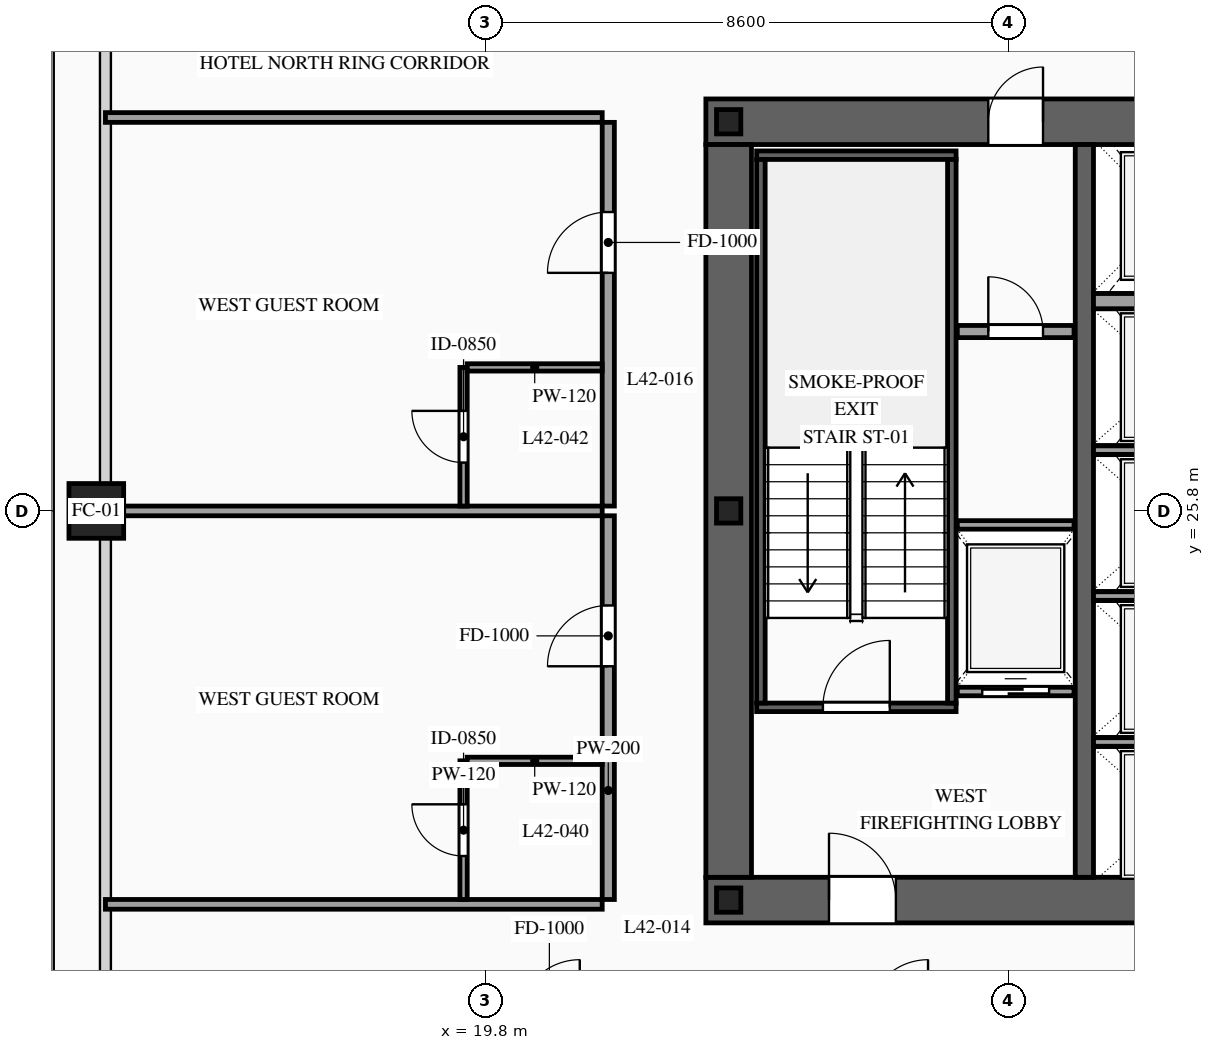
"""IFC4 building model, lengths in metres.
Left out: names, types, materials, properties, quantities, classifications, styles, units other than length and angle.
Written with IfcOpenShell. Run it as: python <this file> out.ifc"""

import sys

from ifc_helpers import new_model, si_unit, direction, frame, frame_2d, origin, origin_2d, place, context, subcontext, project, spatial, rectangle, hollow_rectangle, i_section, extrude, source, transform, mapped, element, fill, save


model = new_model("IFC4")
c1 = context("Model", 3, precision=1e-05, world=origin(), true_north=direction((0.0, 1.0)))
c2 = subcontext(c1, "Body", "Model", "MODEL_VIEW")
j1 = project(units=[si_unit("LENGTHUNIT", "METRE"), si_unit("PLANEANGLEUNIT", "RADIAN")], contexts=[c1])
p1 = place(None, origin())
s1 = spatial("IfcSite", under=j1, at=p1, CompositionType="ELEMENT")
p2 = place(p1, origin())
s2 = spatial("IfcBuilding", under=s1, at=p2, CompositionType="ELEMENT")
p3 = place(p2, frame((0.0, 0.0, 159.6)))
s3 = spatial("IfcBuildingStorey", under=s2, at=p3, CompositionType="ELEMENT", Elevation=159.6)
p4 = place(p3, frame((23.425, 19.4, 0.0), z_axis=(0.0, 0.0, 1.0), x_axis=(1.0, 0.0, 0.0)))
e1 = element("IfcWall", 1, at=p4, inside=s3, PredefinedType="SHEAR", context=c2, shape_type="SweptSolid", body=[
    extrude(rectangle(XDim=27.15, YDim=0.75, at=frame_2d((13.575, 0.0))), origin(), (0.0, 0.0, 1.0), 3.6),
])
p5 = place(p4, frame((2.025, 0.0, 0.0)))
e2 = element("IfcOpeningElement", 2, at=p5, cuts=e1, PredefinedType="OPENING", context=c2, shape_type="SweptSolid", body=[
    extrude(rectangle(XDim=1.1, YDim=2.2, at=frame_2d((0.55, 1.1))), frame((0.0, 0.39, 0.0), z_axis=(0.0, -1.0, 0.0), x_axis=(1.0, 0.0, 0.0)), (0.0, 0.0, 1.0), 0.78),
])
p6 = place(p4, frame((9.925, 0.0, 0.0)))
e3 = element("IfcOpeningElement", 3, at=p6, cuts=e1, PredefinedType="OPENING", context=c2, shape_type="SweptSolid", body=[
    extrude(rectangle(XDim=1.1, YDim=2.2, at=frame_2d((0.55, 1.1))), frame((0.0, 0.39, 0.0), z_axis=(0.0, -1.0, 0.0), x_axis=(1.0, 0.0, 0.0)), (0.0, 0.0, 1.0), 0.78),
])
p7 = place(p4, frame((23.125, 0.0, 0.0)))
e4 = element("IfcOpeningElement", 4, at=p7, cuts=e1, PredefinedType="OPENING", context=c2, shape_type="SweptSolid", body=[
    extrude(rectangle(XDim=1.1, YDim=2.2, at=frame_2d((0.55, 1.1))), frame((0.0, 0.39, 0.0), z_axis=(0.0, -1.0, 0.0), x_axis=(1.0, 0.0, 0.0)), (0.0, 0.0, 1.0), 0.78),
])
p8 = place(p4, frame((19.745, 0.0, 0.0)))
e5 = element("IfcOpeningElement", 5, at=p8, cuts=e1, PredefinedType="OPENING", context=c2, shape_type="SweptSolid", body=[
    extrude(rectangle(XDim=0.9, YDim=2.15, at=frame_2d((0.45, 1.075))), frame((0.0, 0.39, 0.0), z_axis=(0.0, -1.0, 0.0), x_axis=(1.0, 0.0, 0.0)), (0.0, 0.0, 1.0), 0.78),
])
p9 = place(p4, frame((18.305, 0.0, 0.0)))
e6 = element("IfcOpeningElement", 6, at=p9, cuts=e1, PredefinedType="OPENING", context=c2, shape_type="SweptSolid", body=[
    extrude(rectangle(XDim=0.9, YDim=2.15, at=frame_2d((0.45, 1.075))), frame((0.0, 0.39, 0.0), z_axis=(0.0, -1.0, 0.0), x_axis=(1.0, 0.0, 0.0)), (0.0, 0.0, 1.0), 0.78),
])
p10 = place(p3, frame((23.425, 32.2, 0.0), z_axis=(0.0, 0.0, 1.0), x_axis=(1.0, 0.0, 0.0)))
e7 = element("IfcWall", 7, at=p10, inside=s3, PredefinedType="SHEAR", context=c2, shape_type="SweptSolid", body=[
    extrude(rectangle(XDim=27.15, YDim=0.75, at=frame_2d((13.575, 0.0))), origin(), (0.0, 0.0, 1.0), 3.6),
])
p11 = place(p10, frame((4.645, 0.0, 0.0)))
e8 = element("IfcOpeningElement", 8, at=p11, cuts=e7, PredefinedType="OPENING", context=c2, shape_type="SweptSolid", body=[
    extrude(rectangle(XDim=0.9, YDim=2.15, at=frame_2d((0.45, 1.075))), frame((0.0, 0.39, 0.0), z_axis=(0.0, -1.0, 0.0), x_axis=(1.0, 0.0, 0.0)), (0.0, 0.0, 1.0), 0.78),
])
p12 = place(p10, frame((9.925, 0.0, 0.0)))
e9 = element("IfcOpeningElement", 9, at=p12, cuts=e7, PredefinedType="OPENING", context=c2, shape_type="SweptSolid", body=[
    extrude(rectangle(XDim=1.1, YDim=2.2, at=frame_2d((0.55, 1.1))), frame((0.0, 0.39, 0.0), z_axis=(0.0, -1.0, 0.0), x_axis=(1.0, 0.0, 0.0)), (0.0, 0.0, 1.0), 0.78),
])
p13 = place(p10, frame((15.775, 0.0, 0.0)))
e10 = element("IfcOpeningElement", 10, at=p13, cuts=e7, PredefinedType="OPENING", context=c2, shape_type="SweptSolid", body=[
    extrude(rectangle(XDim=1.1, YDim=2.2, at=frame_2d((0.55, 1.1))), frame((0.0, 0.39, 0.0), z_axis=(0.0, -1.0, 0.0), x_axis=(1.0, 0.0, 0.0)), (0.0, 0.0, 1.0), 0.78),
])
p14 = place(p10, frame((18.305, 0.0, 0.0)))
e11 = element("IfcOpeningElement", 11, at=p14, cuts=e7, PredefinedType="OPENING", context=c2, shape_type="SweptSolid", body=[
    extrude(rectangle(XDim=0.9, YDim=2.15, at=frame_2d((0.45, 1.075))), frame((0.0, 0.39, 0.0), z_axis=(0.0, -1.0, 0.0), x_axis=(1.0, 0.0, 0.0)), (0.0, 0.0, 1.0), 0.78),
])
p15 = place(p10, frame((19.745, 0.0, 0.0)))
e12 = element("IfcOpeningElement", 12, at=p15, cuts=e7, PredefinedType="OPENING", context=c2, shape_type="SweptSolid", body=[
    extrude(rectangle(XDim=0.9, YDim=2.15, at=frame_2d((0.45, 1.075))), frame((0.0, 0.39, 0.0), z_axis=(0.0, -1.0, 0.0), x_axis=(1.0, 0.0, 0.0)), (0.0, 0.0, 1.0), 0.78),
])
m1 = source(origin(), c2, "Body", "SweptSolid", [
    extrude(rectangle(XDim=12.05, YDim=0.75, at=frame_2d((6.025, 0.0))), origin(), (0.0, 0.0, 1.0), 3.6),
])
p16 = place(p3, frame((23.8, 19.775, 0.0), z_axis=(0.0, 0.0, 1.0), x_axis=(0.0, 1.0, 0.0)))
e13 = element("IfcWall", 13, at=p16, inside=s3, PredefinedType="SHEAR", context=c2, shape_type="MappedRepresentation", body=[
    mapped(m1, transform((0.0, 0.0, 0.0), scale=1.0)),
])
m2 = source(origin(), c2, "Body", "SweptSolid", [
    extrude(rectangle(XDim=12.05, YDim=0.3, at=frame_2d((6.025, 0.0))), origin(), (0.0, 0.0, 1.0), 3.6),
])
p17 = place(p3, frame((29.65, 19.775, 0.0), z_axis=(0.0, 0.0, 1.0), x_axis=(0.0, 1.0, 0.0)))
e14 = element("IfcWall", 14, at=p17, inside=s3, PredefinedType="SOLIDWALL", context=c2, shape_type="MappedRepresentation", body=[
    mapped(m2, transform((0.0, 0.0, 0.0), scale=1.0)),
])
m3 = source(origin(), c2, "Body", "SweptSolid", [
    extrude(i_section(OverallWidth=0.4, OverallDepth=0.4, WebThickness=0.013, FlangeThickness=0.021, at=origin_2d()), origin(), (0.0, 0.0, 1.0), 3.6),
])
for number, where, z_axis, x_axis in (
    (15, (23.8, 19.4, 0.0), (0.0, 0.0, 1.0), (1.0, 0.0, 0.0)),
    (16, (23.8, 25.8, 0.0), (0.0, 0.0, 1.0), (1.0, 0.0, 0.0)),
    (17, (23.8, 32.2, 0.0), (0.0, 0.0, 1.0), (1.0, 0.0, 0.0)),
):
    element("IfcColumn", number, at=place(p3, frame(where, z_axis=z_axis, x_axis=x_axis)), inside=s3, PredefinedType="COLUMN", context=c2, shape_type="MappedRepresentation", body=[
        mapped(m3, transform((0.0, 0.0, 0.0), scale=1.0)),
    ])
m4 = source(origin(), c2, "Body", "SweptSolid", [
    extrude(hollow_rectangle(XDim=0.9, YDim=0.9, WallThickness=0.042, at=origin_2d()), origin(), (0.0, 0.0, 1.0), 3.6),
])
p18 = place(p3, frame((13.4, 25.8, 0.0), z_axis=(0.0, 0.0, 1.0), x_axis=(1.0, 0.0, 0.0)))
e18 = element("IfcColumn", 18, at=p18, inside=s3, PredefinedType="COLUMN", context=c2, shape_type="MappedRepresentation", body=[
    mapped(m4, transform((0.0, 0.0, 0.0), scale=1.0)),
])
p19 = place(p3, frame((27.56, 22.83, 0.0), z_axis=(0.0, 0.0, 1.0), x_axis=(1.0, 0.0, 0.0)))
e19 = element("IfcWall", 19, at=p19, inside=s3, PredefinedType="SOLIDWALL", context=c2, shape_type="SweptSolid", body=[
    extrude(rectangle(XDim=1.92, YDim=0.14, at=frame_2d((0.96, 0.0))), origin(), (0.0, 0.0, 1.0), 3.38),
])
p20 = place(p19, frame((0.41, 0.0, 0.0)))
e20 = element("IfcOpeningElement", 20, at=p20, cuts=e19, PredefinedType="OPENING", context=c2, shape_type="SweptSolid", body=[
    extrude(rectangle(XDim=1.1, YDim=2.2, at=frame_2d((0.55, 1.1))), frame((0.0, 0.085, 0.0), z_axis=(0.0, -1.0, 0.0), x_axis=(1.0, 0.0, 0.0)), (0.0, 0.0, 1.0), 0.17),
])
m5 = source(origin(), c2, "Body", "SweptSolid", [
    extrude(rectangle(XDim=1.92, YDim=0.14, at=frame_2d((0.96, 0.0))), origin(), (0.0, 0.0, 1.0), 3.38),
])
p21 = place(p3, frame((27.56, 25.57, 0.0), z_axis=(0.0, 0.0, 1.0), x_axis=(1.0, 0.0, 0.0)))
e21 = element("IfcWall", 21, at=p21, inside=s3, PredefinedType="SOLIDWALL", context=c2, shape_type="MappedRepresentation", body=[
    mapped(m5, transform((0.0, 0.0, 0.0), scale=1.0)),
])
m6 = source(origin(), c2, "Body", "SweptSolid", [
    extrude(rectangle(XDim=2.5, YDim=0.14, at=frame_2d((1.25, 0.0))), origin(), (0.0, 0.0, 1.0), 3.38),
])
for number, where, z_axis, x_axis in (
    (22, (29.8, 22.0, 0.0), (0.0, 0.0, 1.0), (1.0, 0.0, 0.0)),
    (23, (29.8, 24.4, 0.0), (0.0, 0.0, 1.0), (1.0, 0.0, 0.0)),
    (24, (29.8, 26.8, 0.0), (0.0, 0.0, 1.0), (1.0, 0.0, 0.0)),
):
    element("IfcWall", number, at=place(p3, frame(where, z_axis=z_axis, x_axis=x_axis)), inside=s3, PredefinedType="SOLIDWALL", context=c2, shape_type="MappedRepresentation", body=[
        mapped(m6, transform((0.0, 0.0, 0.0), scale=1.0)),
    ])
m7 = source(origin(), c2, "Body", "SweptSolid", [
    extrude(rectangle(XDim=2.5, YDim=0.25, at=frame_2d((1.25, 0.0))), origin(), (0.0, 0.0, 1.0), 3.38),
])
p22 = place(p3, frame((29.8, 29.25, 0.0), z_axis=(0.0, 0.0, 1.0), x_axis=(1.0, 0.0, 0.0)))
e25 = element("IfcWall", 25, at=p22, inside=s3, PredefinedType="SOLIDWALL", context=c2, shape_type="MappedRepresentation", body=[
    mapped(m7, transform((0.0, 0.0, 0.0), scale=1.0)),
])
p23 = place(p3, frame((24.26, 22.57, 0.0), z_axis=(0.0, 0.0, 1.0), x_axis=(1.0, 0.0, 0.0)))
e26 = element("IfcWall", 26, at=p23, inside=s3, PredefinedType="SOLIDWALL", context=c2, shape_type="SweptSolid", body=[
    extrude(rectangle(XDim=3.28, YDim=0.14, at=frame_2d((1.64, 0.0))), origin(), (0.0, 0.0, 1.0), 3.38),
])
p24 = place(p23, frame((1.09, 0.0, 0.0)))
e27 = element("IfcOpeningElement", 27, at=p24, cuts=e26, PredefinedType="OPENING", context=c2, shape_type="SweptSolid", body=[
    extrude(rectangle(XDim=1.1, YDim=2.2, at=frame_2d((0.55, 1.1))), frame((0.0, 0.085, 0.0), z_axis=(0.0, -1.0, 0.0), x_axis=(1.0, 0.0, 0.0)), (0.0, 0.0, 1.0), 0.17),
])
m8 = source(origin(), c2, "Body", "SweptSolid", [
    extrude(rectangle(XDim=3.28, YDim=0.14, at=frame_2d((1.64, 0.0))), origin(), (0.0, 0.0, 1.0), 3.38),
])
p25 = place(p3, frame((24.26, 31.65, 0.0), z_axis=(0.0, 0.0, 1.0), x_axis=(1.0, 0.0, 0.0)))
e28 = element("IfcWall", 28, at=p25, inside=s3, PredefinedType="SOLIDWALL", context=c2, shape_type="MappedRepresentation", body=[
    mapped(m8, transform((0.0, 0.0, 0.0), scale=1.0)),
])
m9 = source(origin(), c2, "Body", "SweptSolid", [
    extrude(rectangle(XDim=8.94, YDim=0.14, at=frame_2d((4.47, 0.0))), origin(), (0.0, 0.0, 1.0), 3.38),
])
for number, where, z_axis, x_axis in (
    (29, (24.33, 22.64, 0.0), (0.0, 0.0, 1.0), (0.0, 1.0, 0.0)),
    (30, (27.47, 22.64, 0.0), (0.0, 0.0, 1.0), (0.0, 1.0, 0.0)),
):
    element("IfcWall", number, at=place(p3, frame(where, z_axis=z_axis, x_axis=x_axis)), inside=s3, PredefinedType="SOLIDWALL", context=c2, shape_type="MappedRepresentation", body=[
        mapped(m9, transform((0.0, 0.0, 0.0), scale=1.0)),
    ])
p26 = place(p3, frame((27.56, 28.75, 0.0), z_axis=(0.0, 0.0, 1.0), x_axis=(1.0, 0.0, 0.0)))
e31 = element("IfcWall", 31, at=p26, inside=s3, PredefinedType="PARTITIONING", context=c2, shape_type="SweptSolid", body=[
    extrude(rectangle(XDim=1.92, YDim=0.2, at=frame_2d((0.96, 0.0))), origin(), (0.0, 0.0, 1.0), 3.38),
])
p27 = place(p26, frame((0.51, 0.0, 0.0)))
e32 = element("IfcOpeningElement", 32, at=p27, cuts=e31, PredefinedType="OPENING", context=c2, shape_type="SweptSolid", body=[
    extrude(rectangle(XDim=0.9, YDim=2.15, at=frame_2d((0.45, 1.075))), frame((0.0, 0.115, 0.0), z_axis=(0.0, -1.0, 0.0), x_axis=(1.0, 0.0, 0.0)), (0.0, 0.0, 1.0), 0.23),
])
p28 = place(p3, frame((21.82, 19.41, 0.0), z_axis=(0.0, 0.0, 1.0), x_axis=(0.0, 1.0, 0.0)))
e33 = element("IfcWall", 33, at=p28, inside=s3, PredefinedType="PARTITIONING", context=c2, shape_type="SweptSolid", body=[
    extrude(rectangle(XDim=6.31, YDim=0.2, at=frame_2d((3.155, 0.0))), origin(), (0.0, 0.0, 1.0), 3.38),
])
p29 = place(p28, frame((3.835, 0.0, 0.0)))
e34 = element("IfcOpeningElement", 34, at=p29, cuts=e33, PredefinedType="OPENING", context=c2, shape_type="SweptSolid", body=[
    extrude(rectangle(XDim=1.0, YDim=2.2, at=frame_2d((0.5, 1.1))), frame((0.0, 0.115, 0.0), z_axis=(0.0, -1.0, 0.0), x_axis=(1.0, 0.0, 0.0)), (0.0, 0.0, 1.0), 0.23),
])
m10 = source(origin(), c2, "Body", "SweptSolid", [
    extrude(rectangle(XDim=8.17, YDim=0.16, at=frame_2d((4.085, 0.0))), origin(), (0.0, 0.0, 1.0), 2.675),
])
p30 = place(p3, frame((13.55, 25.8, 0.0), z_axis=(0.0, 0.0, 1.0), x_axis=(1.0, 0.0, 0.0)))
e35 = element("IfcWall", 35, at=p30, inside=s3, PredefinedType="PARTITIONING", context=c2, shape_type="MappedRepresentation", body=[
    mapped(m10, transform((0.0, 0.0, 0.0), scale=1.0)),
])
m11 = source(origin(), c2, "Body", "SweptSolid", [
    extrude(rectangle(XDim=8.17, YDim=0.16, at=frame_2d((4.085, 0.0))), origin(), (0.0, 0.0, 1.0), 2.875),
])
p31 = place(p3, frame((13.55, 19.33, 0.0), z_axis=(0.0, 0.0, 1.0), x_axis=(1.0, 0.0, 0.0)))
e36 = element("IfcWall", 36, at=p31, inside=s3, PredefinedType="PARTITIONING", context=c2, shape_type="MappedRepresentation", body=[
    mapped(m11, transform((0.0, 0.0, 0.0), scale=1.0)),
])
p32 = place(p3, frame((19.44, 19.41, 0.0), z_axis=(0.0, 0.0, 1.0), x_axis=(0.0, 1.0, 0.0)))
e37 = element("IfcWall", 37, at=p32, inside=s3, PredefinedType="PARTITIONING", context=c2, shape_type="SweptSolid", body=[
    extrude(rectangle(XDim=2.28, YDim=0.12, at=frame_2d((1.14, 0.0))), origin(), (0.0, 0.0, 1.0), 3.38),
])
p33 = place(p32, frame((0.715, 0.0, 0.0)))
e38 = element("IfcOpeningElement", 38, at=p33, cuts=e37, PredefinedType="OPENING", context=c2, shape_type="SweptSolid", body=[
    extrude(rectangle(XDim=0.85, YDim=2.1, at=frame_2d((0.425, 1.05))), frame((0.0, 0.075, 0.0), z_axis=(0.0, -1.0, 0.0), x_axis=(1.0, 0.0, 0.0)), (0.0, 0.0, 1.0), 0.15),
])
m12 = source(origin(), c2, "Body", "SweptSolid", [
    extrude(rectangle(XDim=2.22, YDim=0.12, at=frame_2d((1.11, 0.0))), origin(), (0.0, 0.0, 1.0), 3.38),
])
p34 = place(p3, frame((19.5, 21.69, 0.0), z_axis=(0.0, 0.0, 1.0), x_axis=(1.0, 0.0, 0.0)))
e39 = element("IfcWall", 39, at=p34, inside=s3, PredefinedType="PARTITIONING", context=c2, shape_type="MappedRepresentation", body=[
    mapped(m12, transform((0.0, 0.0, 0.0), scale=1.0)),
])
p35 = place(p3, frame((21.82, 25.88, 0.0), z_axis=(0.0, 0.0, 1.0), x_axis=(0.0, 1.0, 0.0)))
e40 = element("IfcWall", 40, at=p35, inside=s3, PredefinedType="PARTITIONING", context=c2, shape_type="SweptSolid", body=[
    extrude(rectangle(XDim=6.31, YDim=0.2, at=frame_2d((3.155, 0.0))), origin(), (0.0, 0.0, 1.0), 3.38),
])
p36 = place(p35, frame((3.835, 0.0, 0.0)))
e41 = element("IfcOpeningElement", 41, at=p36, cuts=e40, PredefinedType="OPENING", context=c2, shape_type="SweptSolid", body=[
    extrude(rectangle(XDim=1.0, YDim=2.2, at=frame_2d((0.5, 1.1))), frame((0.0, 0.115, 0.0), z_axis=(0.0, -1.0, 0.0), x_axis=(1.0, 0.0, 0.0)), (0.0, 0.0, 1.0), 0.23),
])
p37 = place(p3, frame((13.55, 32.27, 0.0), z_axis=(0.0, 0.0, 1.0), x_axis=(1.0, 0.0, 0.0)))
e42 = element("IfcWall", 42, at=p37, inside=s3, PredefinedType="PARTITIONING", context=c2, shape_type="MappedRepresentation", body=[
    mapped(m11, transform((0.0, 0.0, 0.0), scale=1.0)),
])
p38 = place(p3, frame((19.44, 25.88, 0.0), z_axis=(0.0, 0.0, 1.0), x_axis=(0.0, 1.0, 0.0)))
e43 = element("IfcWall", 43, at=p38, inside=s3, PredefinedType="PARTITIONING", context=c2, shape_type="SweptSolid", body=[
    extrude(rectangle(XDim=2.28, YDim=0.12, at=frame_2d((1.14, 0.0))), origin(), (0.0, 0.0, 1.0), 3.38),
])
p39 = place(p38, frame((0.715, 0.0, 0.0)))
e44 = element("IfcOpeningElement", 44, at=p39, cuts=e43, PredefinedType="OPENING", context=c2, shape_type="SweptSolid", body=[
    extrude(rectangle(XDim=0.85, YDim=2.1, at=frame_2d((0.425, 1.05))), frame((0.0, 0.075, 0.0), z_axis=(0.0, -1.0, 0.0), x_axis=(1.0, 0.0, 0.0)), (0.0, 0.0, 1.0), 0.15),
])
p40 = place(p3, frame((19.5, 28.16, 0.0), z_axis=(0.0, 0.0, 1.0), x_axis=(1.0, 0.0, 0.0)))
e45 = element("IfcWall", 45, at=p40, inside=s3, PredefinedType="PARTITIONING", context=c2, shape_type="MappedRepresentation", body=[
    mapped(m12, transform((0.0, 0.0, 0.0), scale=1.0)),
])
m13 = source(origin(), c2, "Body", "SweptSolid", [
    extrude(rectangle(XDim=1.1, YDim=2.2, at=frame_2d((0.55, 1.1))), frame((0.0, 0.025, 0.0), z_axis=(0.0, -1.0, 0.0), x_axis=(1.0, 0.0, 0.0)), (0.0, 0.0, 1.0), 0.05),
])
p41 = place(p20, origin())
e46 = element("IfcDoor", 46, at=p41, inside=s3, OperationType="SLIDING_TO_LEFT", PredefinedType="DOOR", context=c2, shape_type="MappedRepresentation", body=[
    mapped(m13, transform((0.0, 0.0, 0.0), scale=1.0)),
])
fill(e20, e46)
m14 = source(origin(), c2, "Body", "SweptSolid", [
    extrude(rectangle(XDim=1.1, YDim=2.2, at=frame_2d((0.55, 1.1))), frame((0.0, 0.025, 0.0), z_axis=(0.0, -1.0, 0.0), x_axis=(1.0, 0.0, 0.0)), (0.0, 0.0, 1.0), 0.05),
])
p42 = place(p24, origin())
e47 = element("IfcDoor", 47, at=p42, inside=s3, OperationType="SINGLE_SWING_RIGHT", PredefinedType="DOOR", context=c2, shape_type="MappedRepresentation", body=[
    mapped(m14, transform((0.0, 0.0, 0.0), scale=1.0)),
])
fill(e27, e47)
p43 = place(p5, origin())
e48 = element("IfcDoor", 48, at=p43, inside=s3, OperationType="SINGLE_SWING_LEFT", PredefinedType="DOOR", context=c2, shape_type="MappedRepresentation", body=[
    mapped(m14, transform((0.0, 0.0, 0.0), scale=1.0)),
])
fill(e2, e48)
m15 = source(origin(), c2, "Body", "SweptSolid", [
    extrude(rectangle(XDim=0.9, YDim=2.15, at=frame_2d((0.45, 1.075))), frame((0.0, 0.025, 0.0), z_axis=(0.0, -1.0, 0.0), x_axis=(1.0, 0.0, 0.0)), (0.0, 0.0, 1.0), 0.05),
])
p44 = place(p11, origin())
e49 = element("IfcDoor", 49, at=p44, inside=s3, OperationType="SINGLE_SWING_RIGHT", PredefinedType="DOOR", context=c2, shape_type="MappedRepresentation", body=[
    mapped(m15, transform((0.0, 0.0, 0.0), scale=1.0)),
])
fill(e8, e49)
p45 = place(p27, origin())
e50 = element("IfcDoor", 50, at=p45, inside=s3, OperationType="SINGLE_SWING_LEFT", PredefinedType="DOOR", context=c2, shape_type="MappedRepresentation", body=[
    mapped(m15, transform((0.0, 0.0, 0.0), scale=1.0)),
])
fill(e32, e50)
m16 = source(origin(), c2, "Body", "SweptSolid", [
    extrude(rectangle(XDim=1.0, YDim=2.2, at=frame_2d((0.5, 1.1))), frame((0.0, 0.025, 0.0), z_axis=(0.0, -1.0, 0.0), x_axis=(1.0, 0.0, 0.0)), (0.0, 0.0, 1.0), 0.05),
])
p46 = place(p29, origin())
e51 = element("IfcDoor", 51, at=p46, inside=s3, OperationType="SINGLE_SWING_LEFT", PredefinedType="DOOR", context=c2, shape_type="MappedRepresentation", body=[
    mapped(m16, transform((0.0, 0.0, 0.0), scale=1.0)),
])
fill(e34, e51)
m17 = source(origin(), c2, "Body", "SweptSolid", [
    extrude(rectangle(XDim=0.85, YDim=2.1, at=frame_2d((0.425, 1.05))), frame((0.0, 0.025, 0.0), z_axis=(0.0, -1.0, 0.0), x_axis=(1.0, 0.0, 0.0)), (0.0, 0.0, 1.0), 0.05),
])
p47 = place(p33, origin())
e52 = element("IfcDoor", 52, at=p47, inside=s3, OperationType="SINGLE_SWING_RIGHT", PredefinedType="DOOR", context=c2, shape_type="MappedRepresentation", body=[
    mapped(m17, transform((0.0, 0.0, 0.0), scale=1.0)),
])
fill(e38, e52)
p48 = place(p36, origin())
e53 = element("IfcDoor", 53, at=p48, inside=s3, OperationType="SINGLE_SWING_LEFT", PredefinedType="DOOR", context=c2, shape_type="MappedRepresentation", body=[
    mapped(m16, transform((0.0, 0.0, 0.0), scale=1.0)),
])
fill(e41, e53)
p49 = place(p39, origin())
e54 = element("IfcDoor", 54, at=p49, inside=s3, OperationType="SINGLE_SWING_RIGHT", PredefinedType="DOOR", context=c2, shape_type="MappedRepresentation", body=[
    mapped(m17, transform((0.0, 0.0, 0.0), scale=1.0)),
])
fill(e44, e54)
save(model, sys.argv[1])
